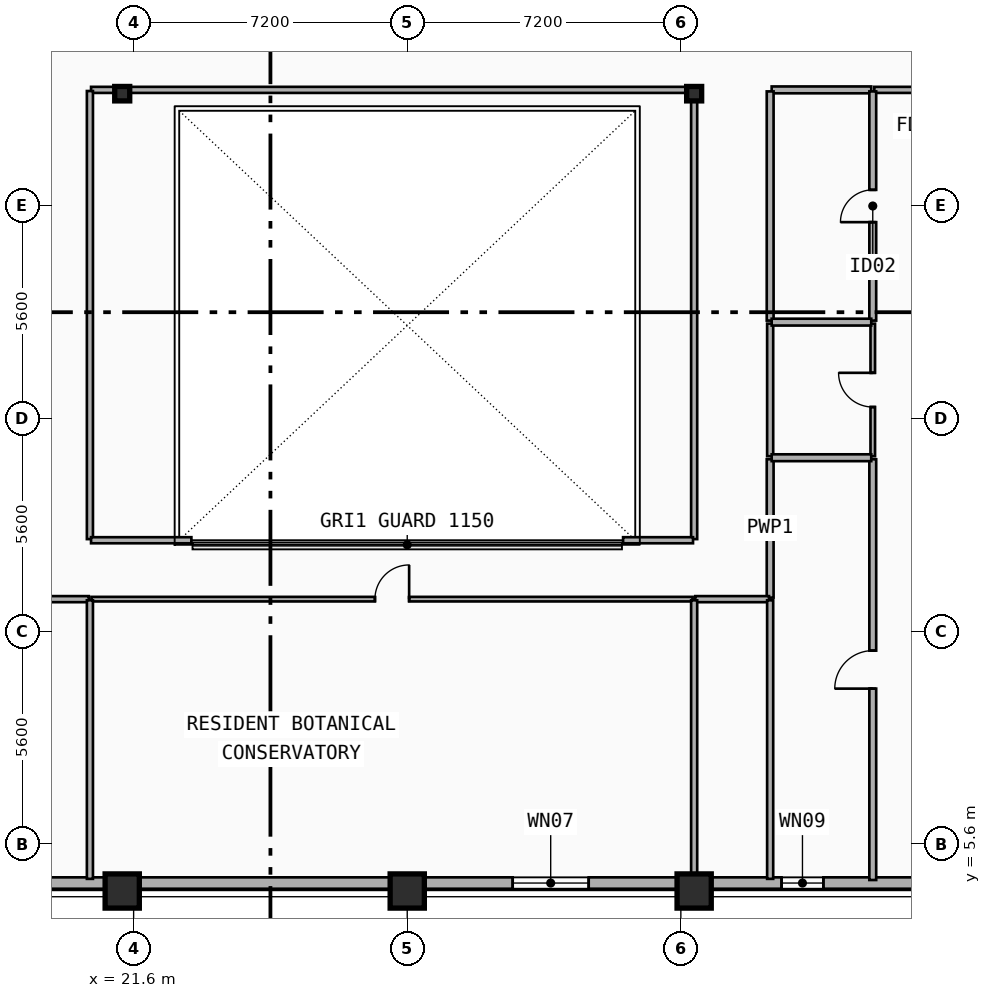
"""IFC4 building model, lengths in metres.
Left out: names, types, materials, properties, quantities, classifications, styles, units other than length and angle.
Written with IfcOpenShell. Run it as: python <this file> out.ifc"""

import sys

from ifc_helpers import new_model, si_unit, direction, frame, frame_2d, origin, origin_2d, place, context, subcontext, project, spatial, rectangle, i_section, extrude, element, fill, save


model = new_model("IFC4")
c1 = context("Model", 3, precision=1e-05, world=origin(), true_north=direction((0.0, 1.0)))
c2 = subcontext(c1, "Body", "Model", "MODEL_VIEW")
j1 = project(units=[si_unit("LENGTHUNIT", "METRE"), si_unit("PLANEANGLEUNIT", "RADIAN")], contexts=[c1])
p1 = place(None, origin())
s1 = spatial("IfcSite", under=j1, at=p1, CompositionType="ELEMENT")
p2 = place(p1, origin())
s2 = spatial("IfcBuilding", under=s1, at=p2, CompositionType="ELEMENT")
p3 = place(p2, frame((0.0, 0.0, 240.0)))
s3 = spatial("IfcBuildingStorey", under=s2, at=p3, CompositionType="ELEMENT", Elevation=240.0)
for number, where, z_axis, x_axis in (
    (1, (21.3, 25.35, 0.0), (0.0, 0.0, 1.0), (1.0, 0.0, 0.0)),
    (2, (36.35, 25.35, 0.0), (0.0, 0.0, 1.0), (1.0, 0.0, 0.0)),
):
    element("IfcColumn", number, at=place(p3, frame(where, z_axis=z_axis, x_axis=x_axis)), inside=s3, PredefinedType="COLUMN", context=c2, shape_type="SweptSolid", body=[
        extrude(i_section(OverallWidth=0.395, OverallDepth=0.38, WebThickness=0.019, FlangeThickness=0.03, FilletRadius=0.015, at=origin_2d()), origin(), (0.0, 0.0, 1.0), 3.6),
    ])
for number, where, z_axis, x_axis in (
    (3, (21.3, 4.479, 0.0), (0.0, -0.09, 0.996), (1.0, 0.0, 0.0)),
    (4, (28.8, 4.479, 0.0), (0.0, -0.09, 0.996), (1.0, 0.0, 0.0)),
    (5, (36.35, 4.479, 0.0), (0.0, -0.09, 0.996), (1.0, 0.0, 0.0)),
):
    element("IfcColumn", number, at=place(p3, frame(where, z_axis=z_axis, x_axis=x_axis)), inside=s3, PredefinedType="COLUMN", context=c2, shape_type="SweptSolid", body=[
        extrude(rectangle(XDim=0.9, YDim=0.9, at=origin_2d()), origin(), (0.0, 0.0, 1.0), 3.615),
    ])
p4 = place(p3, frame((48.0, 4.58, 0.0), z_axis=(0.0, 0.0, 1.0), x_axis=(-1.0, 0.0, 0.0)))
e6 = element("IfcWall", 6, at=p4, inside=s3, PredefinedType="SOLIDWALL", context=c2, shape_type="SweptSolid", body=[
    extrude(rectangle(XDim=38.4, YDim=0.3, at=frame_2d((19.2, 0.0))), origin(), (0.0, 0.0, 1.0), 3.28),
])
p5 = place(p4, frame((33.595, 0.0, 0.34)))
e7 = element("IfcOpeningElement", 7, at=p5, cuts=e6, PredefinedType="OPENING", context=c2, shape_type="SweptSolid", body=[
    extrude(rectangle(XDim=1.4, YDim=1.8, at=frame_2d((0.7, 0.9))), frame((0.0, 0.16, 0.0), z_axis=(0.0, -1.0, 0.0), x_axis=(1.0, 0.0, 0.0)), (0.0, 0.0, 1.0), 0.32),
])
p6 = place(p4, frame((14.425, 0.0, 0.48)))
e8 = element("IfcOpeningElement", 8, at=p6, cuts=e6, PredefinedType="OPENING", context=c2, shape_type="SweptSolid", body=[
    extrude(rectangle(XDim=2.0, YDim=2.2, at=frame_2d((1.0, 1.1))), frame((0.0, 0.16, 0.0), z_axis=(0.0, -1.0, 0.0), x_axis=(1.0, 0.0, 0.0)), (0.0, 0.0, 1.0), 0.32),
])
p7 = place(p4, frame((3.691, 0.0, 1.22)))
e9 = element("IfcOpeningElement", 9, at=p7, cuts=e6, PredefinedType="OPENING", context=c2, shape_type="SweptSolid", body=[
    extrude(rectangle(XDim=1.2, YDim=1.5, at=frame_2d((0.6, 0.75))), frame((0.0, 0.16, 0.0), z_axis=(0.0, -1.0, 0.0), x_axis=(1.0, 0.0, 0.0)), (0.0, 0.0, 1.0), 0.32),
])
p8 = place(p4, frame((8.25, 0.0, 0.52)))
e10 = element("IfcOpeningElement", 10, at=p8, cuts=e6, PredefinedType="OPENING", context=c2, shape_type="SweptSolid", body=[
    extrude(rectangle(XDim=1.1, YDim=1.05, at=frame_2d((0.55, 0.525))), frame((0.0, 0.16, 0.0), z_axis=(0.0, -1.0, 0.0), x_axis=(1.0, 0.0, 0.0)), (0.0, 0.0, 1.0), 0.32),
])
p9 = place(p4, frame((0.357, 0.0, 0.75)))
e11 = element("IfcOpeningElement", 11, at=p9, cuts=e6, PredefinedType="OPENING", context=c2, shape_type="SweptSolid", body=[
    extrude(rectangle(XDim=1.4, YDim=1.8, at=frame_2d((0.7, 0.9))), frame((0.0, 0.16, 0.0), z_axis=(0.0, -1.0, 0.0), x_axis=(1.0, 0.0, 0.0)), (0.0, 0.0, 1.0), 0.32),
])
p10 = place(p3, frame((41.09, 25.45, 0.0), z_axis=(0.0, 0.0, 1.0), x_axis=(1.0, 0.0, 0.0)))
e12 = element("IfcWall", 12, at=p10, inside=s3, PredefinedType="PARTITIONING", context=c2, shape_type="SweptSolid", body=[
    extrude(rectangle(XDim=3.479, YDim=0.16, at=frame_2d((1.74, 0.0))), origin(), (0.0, 0.0, 1.0), 3.28),
])
p11 = place(p10, frame((1.24, 0.0, 0.0)))
e13 = element("IfcOpeningElement", 13, at=p11, cuts=e12, PredefinedType="OPENING", context=c2, shape_type="SweptSolid", body=[
    extrude(rectangle(XDim=1.0, YDim=2.15, at=frame_2d((0.5, 1.075))), frame((0.0, 0.09, 0.0), z_axis=(0.0, -1.0, 0.0), x_axis=(1.0, 0.0, 0.0)), (0.0, 0.0, 1.0), 0.18),
])
p12 = place(p3, frame((38.39, 25.45, 0.0), z_axis=(0.0, 0.0, 1.0), x_axis=(1.0, 0.0, 0.0)))
e14 = element("IfcWall", 14, at=p12, inside=s3, PredefinedType="PLUMBINGWALL", context=c2, shape_type="SweptSolid", body=[
    extrude(rectangle(XDim=2.62, YDim=0.18, at=frame_2d((1.31, 0.0))), origin(), (0.0, 0.0, 1.0), 3.28),
])
p13 = place(p3, frame((38.35, 12.09, 0.0), z_axis=(0.0, 0.0, 1.0), x_axis=(0.0, 1.0, 0.0)))
e15 = element("IfcWall", 15, at=p13, inside=s3, PredefinedType="PLUMBINGWALL", context=c2, shape_type="SweptSolid", body=[
    extrude(rectangle(XDim=3.641, YDim=0.18, at=frame_2d((1.82, 0.0))), origin(), (0.0, 0.0, 1.0), 2.71),
])
p14 = place(p3, frame((38.35, 15.811, 0.0), z_axis=(0.0, 0.0, 1.0), x_axis=(0.0, 1.0, 0.0)))
e16 = element("IfcWall", 16, at=p14, inside=s3, PredefinedType="PARTITIONING", context=c2, shape_type="SweptSolid", body=[
    extrude(rectangle(XDim=3.488, YDim=0.16, at=frame_2d((1.744, 0.0))), origin(), (0.0, 0.0, 1.0), 2.71),
])
p15 = place(p3, frame((38.35, 19.379, 0.0), z_axis=(0.0, 0.0, 1.0), x_axis=(0.0, 1.0, 0.0)))
e17 = element("IfcWall", 17, at=p15, inside=s3, PredefinedType="PLUMBINGWALL", context=c2, shape_type="SweptSolid", body=[
    extrude(rectangle(XDim=6.031, YDim=0.18, at=frame_2d((3.016, 0.0))), origin(), (0.0, 0.0, 1.0), 2.71),
])
p16 = place(p3, frame((20.49, 12.05, 0.0), z_axis=(0.0, 0.0, 1.0), x_axis=(1.0, 0.0, 0.0)))
e18 = element("IfcWall", 18, at=p16, inside=s3, PredefinedType="PARTITIONING", context=c2, shape_type="SweptSolid", body=[
    extrude(rectangle(XDim=15.82, YDim=0.12, at=frame_2d((7.91, 0.0))), origin(), (0.0, 0.0, 1.0), 2.56),
])
p17 = place(p16, frame((7.46, 0.0, 0.0)))
e19 = element("IfcOpeningElement", 19, at=p17, cuts=e18, PredefinedType="OPENING", context=c2, shape_type="SweptSolid", body=[
    extrude(rectangle(XDim=0.9, YDim=2.1, at=frame_2d((0.45, 1.05))), frame((0.0, 0.07, 0.0), z_axis=(0.0, -1.0, 0.0), x_axis=(1.0, 0.0, 0.0)), (0.0, 0.0, 1.0), 0.14),
])
p18 = place(p3, frame((41.05, 4.66, 0.0), z_axis=(0.0, 0.0, 1.0), x_axis=(0.0, 1.0, 0.0)))
e20 = element("IfcWall", 20, at=p18, inside=s3, PredefinedType="PLUMBINGWALL", context=c2, shape_type="SweptSolid", body=[
    extrude(rectangle(XDim=11.071, YDim=0.18, at=frame_2d((5.536, 0.0))), origin(), (0.0, 0.0, 1.0), 2.71),
])
p19 = place(p18, frame((5.035, 0.0, 0.0)))
e21 = element("IfcOpeningElement", 21, at=p19, cuts=e20, PredefinedType="OPENING", context=c2, shape_type="SweptSolid", body=[
    extrude(rectangle(XDim=1.0, YDim=2.15, at=frame_2d((0.5, 1.075))), frame((0.0, 0.1, 0.0), z_axis=(0.0, -1.0, 0.0), x_axis=(1.0, 0.0, 0.0)), (0.0, 0.0, 1.0), 0.2),
])
p20 = place(p3, frame((41.05, 15.811, 0.0), z_axis=(0.0, 0.0, 1.0), x_axis=(0.0, 1.0, 0.0)))
e22 = element("IfcWall", 22, at=p20, inside=s3, PredefinedType="PARTITIONING", context=c2, shape_type="SweptSolid", body=[
    extrude(rectangle(XDim=3.488, YDim=0.12, at=frame_2d((1.744, 0.0))), origin(), (0.0, 0.0, 1.0), 2.71),
])
p21 = place(p20, frame((1.294, 0.0, 0.0)))
e23 = element("IfcOpeningElement", 23, at=p21, cuts=e22, PredefinedType="OPENING", context=c2, shape_type="SweptSolid", body=[
    extrude(rectangle(XDim=0.9, YDim=2.1, at=frame_2d((0.45, 1.05))), frame((0.0, 0.07, 0.0), z_axis=(0.0, -1.0, 0.0), x_axis=(1.0, 0.0, 0.0)), (0.0, 0.0, 1.0), 0.14),
])
p22 = place(p3, frame((41.05, 19.379, 0.0), z_axis=(0.0, 0.0, 1.0), x_axis=(0.0, 1.0, 0.0)))
e24 = element("IfcWall", 24, at=p22, inside=s3, PredefinedType="PLUMBINGWALL", context=c2, shape_type="SweptSolid", body=[
    extrude(rectangle(XDim=6.031, YDim=0.18, at=frame_2d((3.016, 0.0))), origin(), (0.0, 0.0, 1.0), 2.71),
])
p23 = place(p22, frame((2.591, 0.0, 0.0)))
e25 = element("IfcOpeningElement", 25, at=p23, cuts=e24, PredefinedType="OPENING", context=c2, shape_type="SweptSolid", body=[
    extrude(rectangle(XDim=0.85, YDim=2.1, at=frame_2d((0.425, 1.05))), frame((0.0, 0.1, 0.0), z_axis=(0.0, -1.0, 0.0), x_axis=(1.0, 0.0, 0.0)), (0.0, 0.0, 1.0), 0.2),
])
p24 = place(p3, frame((38.39, 15.771, 0.0), z_axis=(0.0, 0.0, 1.0), x_axis=(1.0, 0.0, 0.0)))
e26 = element("IfcWall", 26, at=p24, inside=s3, PredefinedType="PLUMBINGWALL", context=c2, shape_type="SweptSolid", body=[
    extrude(rectangle(XDim=2.62, YDim=0.18, at=frame_2d((1.31, 0.0))), origin(), (0.0, 0.0, 1.0), 2.87),
])
p25 = place(p3, frame((38.39, 19.339, 0.0), z_axis=(0.0, 0.0, 1.0), x_axis=(1.0, 0.0, 0.0)))
e27 = element("IfcWall", 27, at=p25, inside=s3, PredefinedType="PLUMBINGWALL", context=c2, shape_type="SweptSolid", body=[
    extrude(rectangle(XDim=2.62, YDim=0.18, at=frame_2d((1.31, 0.0))), origin(), (0.0, 0.0, 1.0), 2.71),
])
p26 = place(p3, frame((20.48, 25.45, 0.0), z_axis=(0.0, 0.0, 1.0), x_axis=(1.0, 0.0, 0.0)))
e28 = element("IfcWall", 28, at=p26, inside=s3, PredefinedType="PARTITIONING", context=c2, shape_type="SweptSolid", body=[
    extrude(rectangle(XDim=15.84, YDim=0.16, at=frame_2d((7.92, 0.0))), origin(), (0.0, 0.0, 1.0), 2.56),
])
p27 = place(p3, frame((18.88, 12.05, 0.0), z_axis=(0.0, 0.0, 1.0), x_axis=(1.0, 0.0, 0.0)))
e29 = element("IfcWall", 29, at=p27, inside=s3, PredefinedType="PARTITIONING", context=c2, shape_type="SweptSolid", body=[
    extrude(rectangle(XDim=1.54, YDim=0.16, at=frame_2d((0.77, 0.0))), origin(), (0.0, 0.0, 1.0), 2.71),
])
p28 = place(p3, frame((20.45, 13.63, 0.0), z_axis=(0.0, 0.0, 1.0), x_axis=(0.0, 1.0, 0.0)))
e30 = element("IfcWall", 30, at=p28, inside=s3, PredefinedType="PARTITIONING", context=c2, shape_type="SweptSolid", body=[
    extrude(rectangle(XDim=11.79, YDim=0.16, at=frame_2d((5.895, 0.0))), origin(), (0.0, 0.0, 1.0), 2.71),
])
p29 = place(p3, frame((36.38, 12.05, 0.0), z_axis=(0.0, 0.0, 1.0), x_axis=(1.0, 0.0, 0.0)))
e31 = element("IfcWall", 31, at=p29, inside=s3, PredefinedType="PARTITIONING", context=c2, shape_type="SweptSolid", body=[
    extrude(rectangle(XDim=1.94, YDim=0.16, at=frame_2d((0.97, 0.0))), origin(), (0.0, 0.0, 1.0), 2.56),
])
p30 = place(p3, frame((36.35, 13.63, 0.0), z_axis=(0.0, 0.0, 1.0), x_axis=(0.0, 1.0, 0.0)))
e32 = element("IfcWall", 32, at=p30, inside=s3, PredefinedType="PARTITIONING", context=c2, shape_type="SweptSolid", body=[
    extrude(rectangle(XDim=11.79, YDim=0.16, at=frame_2d((5.895, 0.0))), origin(), (0.0, 0.0, 1.0), 2.56),
])
p31 = place(p3, frame((20.48, 13.6, 0.0), z_axis=(0.0, 0.0, 1.0), x_axis=(1.0, 0.0, 0.0)))
e33 = element("IfcWall", 33, at=p31, inside=s3, PredefinedType="PARTITIONING", context=c2, shape_type="SweptSolid", body=[
    extrude(rectangle(XDim=2.64, YDim=0.16, at=frame_2d((1.32, 0.0))), origin(), (0.0, 0.0, 1.0), 2.56),
])
p32 = place(p3, frame((34.48, 13.6, 0.0), z_axis=(0.0, 0.0, 1.0), x_axis=(1.0, 0.0, 0.0)))
e34 = element("IfcWall", 34, at=p32, inside=s3, PredefinedType="PARTITIONING", context=c2, shape_type="SweptSolid", body=[
    extrude(rectangle(XDim=1.84, YDim=0.16, at=frame_2d((0.92, 0.0))), origin(), (0.0, 0.0, 1.0), 2.56),
])
p33 = place(p3, frame((20.45, 4.69, 0.0), z_axis=(0.0, 0.0, 1.0), x_axis=(0.0, 1.0, 0.0)))
e35 = element("IfcWall", 35, at=p33, inside=s3, PredefinedType="PARTITIONING", context=c2, shape_type="SweptSolid", body=[
    extrude(rectangle(XDim=7.33, YDim=0.16, at=frame_2d((3.665, 0.0))), origin(), (0.0, 0.0, 1.0), 2.71),
])
p34 = place(p3, frame((36.35, 4.69, 0.0), z_axis=(0.0, 0.0, 1.0), x_axis=(0.0, 1.0, 0.0)))
e36 = element("IfcWall", 36, at=p34, inside=s3, PredefinedType="PARTITIONING", context=c2, shape_type="SweptSolid", body=[
    extrude(rectangle(XDim=7.33, YDim=0.16, at=frame_2d((3.665, 0.0))), origin(), (0.0, 0.0, 1.0), 2.56),
])
p35 = place(p3, frame((38.35, 4.69, 0.0), z_axis=(0.0, 0.0, 1.0), x_axis=(0.0, 1.0, 0.0)))
e37 = element("IfcWall", 37, at=p35, inside=s3, PredefinedType="PARTITIONING", context=c2, shape_type="SweptSolid", body=[
    extrude(rectangle(XDim=7.33, YDim=0.16, at=frame_2d((3.665, 0.0))), origin(), (0.0, 0.0, 1.0), 2.71),
])
p36 = place(p6, origin())
e38 = element("IfcWindow", 38, at=p36, inside=s3, PartitioningType="SINGLE_PANEL", PredefinedType="WINDOW", context=c2, shape_type="SweptSolid", body=[
    extrude(rectangle(XDim=2.0, YDim=2.2, at=frame_2d((1.0, 1.1))), frame((0.0, 0.03, 0.0), z_axis=(0.0, -1.0, 0.0), x_axis=(1.0, 0.0, 0.0)), (0.0, 0.0, 1.0), 0.06),
])
fill(e8, e38)
p37 = place(p8, origin())
e39 = element("IfcWindow", 39, at=p37, inside=s3, PartitioningType="SINGLE_PANEL", PredefinedType="WINDOW", context=c2, shape_type="SweptSolid", body=[
    extrude(rectangle(XDim=1.1, YDim=1.05, at=frame_2d((0.55, 0.525))), frame((0.0, 0.03, 0.0), z_axis=(0.0, -1.0, 0.0), x_axis=(1.0, 0.0, 0.0)), (0.0, 0.0, 1.0), 0.06),
])
fill(e10, e39)
p38 = place(p17, origin())
e40 = element("IfcDoor", 40, at=p38, inside=s3, OperationType="SINGLE_SWING_RIGHT", PredefinedType="DOOR", context=c2, shape_type="SweptSolid", body=[
    extrude(rectangle(XDim=0.9, YDim=2.1, at=frame_2d((0.45, 1.05))), frame((0.0, 0.025, 0.0), z_axis=(0.0, -1.0, 0.0), x_axis=(1.0, 0.0, 0.0)), (0.0, 0.0, 1.0), 0.05),
])
fill(e19, e40)
p39 = place(p19, origin())
e41 = element("IfcDoor", 41, at=p39, inside=s3, OperationType="SINGLE_SWING_LEFT", PredefinedType="DOOR", context=c2, shape_type="SweptSolid", body=[
    extrude(rectangle(XDim=1.0, YDim=2.15, at=frame_2d((0.5, 1.075))), frame((0.0, 0.025, 0.0), z_axis=(0.0, -1.0, 0.0), x_axis=(1.0, 0.0, 0.0)), (0.0, 0.0, 1.0), 0.05),
])
fill(e21, e41)
p40 = place(p21, origin())
e42 = element("IfcDoor", 42, at=p40, inside=s3, OperationType="SINGLE_SWING_RIGHT", PredefinedType="DOOR", context=c2, shape_type="SweptSolid", body=[
    extrude(rectangle(XDim=0.9, YDim=2.1, at=frame_2d((0.45, 1.05))), frame((0.0, 0.025, 0.0), z_axis=(0.0, -1.0, 0.0), x_axis=(1.0, 0.0, 0.0)), (0.0, 0.0, 1.0), 0.05),
])
fill(e23, e42)
p41 = place(p23, origin())
e43 = element("IfcDoor", 43, at=p41, inside=s3, OperationType="SINGLE_SWING_LEFT", PredefinedType="DOOR", context=c2, shape_type="SweptSolid", body=[
    extrude(rectangle(XDim=0.85, YDim=2.1, at=frame_2d((0.425, 1.05))), frame((0.0, 0.025, 0.0), z_axis=(0.0, -1.0, 0.0), x_axis=(1.0, 0.0, 0.0)), (0.0, 0.0, 1.0), 0.05),
])
fill(e25, e43)
save(model, sys.argv[1])
